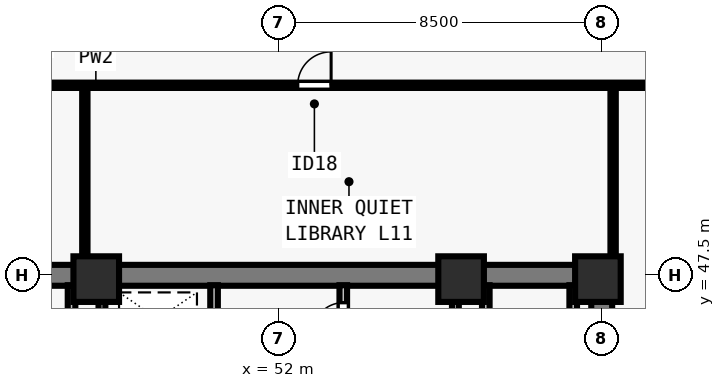
"""IFC4 building model, lengths in metres.
Left out: names, types, materials, properties, quantities, classifications, styles, units other than length and angle.
Written with IfcOpenShell. Run it as: python <this file> out.ifc"""

import sys

from ifc_helpers import new_model, si_unit, direction, frame, frame_2d, origin, origin_2d, place, context, subcontext, project, spatial, rectangle, extrude, element, fill, save


model = new_model("IFC4")
c1 = context("Model", 3, precision=1e-05, world=origin(), true_north=direction((0.0, 1.0)))
c2 = subcontext(c1, "Body", "Model", "MODEL_VIEW")
j1 = project(units=[si_unit("LENGTHUNIT", "METRE"), si_unit("PLANEANGLEUNIT", "RADIAN")], contexts=[c1])
p1 = place(None, origin())
s1 = spatial("IfcSite", under=j1, at=p1, CompositionType="ELEMENT")
p2 = place(p1, origin())
s2 = spatial("IfcBuilding", under=s1, at=p2, CompositionType="ELEMENT")
p3 = place(p2, frame((0.0, 0.0, 44.5)))
s3 = spatial("IfcBuildingStorey", under=s2, at=p3, CompositionType="ELEMENT", Elevation=44.5)
for number, where, z_axis, x_axis in (
    (1, (47.2, 47.4, 0.0), (0.0, 0.0, 1.0), (1.0, 0.0, 0.0)),
    (2, (56.8, 47.4, 0.0), (0.0, 0.0, 1.0), (1.0, 0.0, 0.0)),
    (3, (60.4, 47.4, 0.0), (0.0, 0.0, 1.0), (1.0, 0.0, 0.0)),
):
    element("IfcColumn", number, at=place(p3, frame(where, z_axis=z_axis, x_axis=x_axis)), inside=s3, PredefinedType="COLUMN", context=c2, shape_type="SweptSolid", body=[
        extrude(rectangle(XDim=1.2, YDim=1.2, at=origin_2d()), origin(), (0.0, 0.0, 1.0), 3.5),
    ])
p4 = place(p3, frame((43.225, 47.5, 0.0), z_axis=(0.0, 0.0, 1.0), x_axis=(1.0, 0.0, 0.0)))
e4 = element("IfcWall", 4, at=p4, inside=s3, PredefinedType="SHEAR", context=c2, shape_type="SweptSolid", body=[
    extrude(rectangle(XDim=17.55, YDim=0.55, at=frame_2d((8.775, 0.0))), origin(), (0.0, 0.0, 1.0), 3.28),
])
p5 = place(p3, frame((60.5, 40.8, 0.0), z_axis=(0.0, 0.0, 1.0), x_axis=(0.0, 1.0, 0.0)))
e5 = element("IfcWall", 5, at=p5, inside=s3, PredefinedType="SHEAR", context=c2, shape_type="SweptSolid", body=[
    extrude(rectangle(XDim=6.435, YDim=0.55, at=frame_2d((3.218, 0.0))), origin(), (0.0, 0.0, 1.0), 3.28),
])
p6 = place(p3, frame((50.3, 40.585, 0.0), z_axis=(0.0, 0.0, 1.0), x_axis=(0.0, 1.0, 0.0)))
e6 = element("IfcWall", 6, at=p6, inside=s3, PredefinedType="SOLIDWALL", context=c2, shape_type="SweptSolid", body=[
    extrude(rectangle(XDim=6.655, YDim=0.2, at=frame_2d((3.328, 0.0))), origin(), (0.0, 0.0, 1.0), 3.28),
])
p7 = place(p6, frame((5.065, 0.0, 0.0)))
e7 = element("IfcOpeningElement", 7, at=p7, cuts=e6, PredefinedType="OPENING", context=c2, shape_type="SweptSolid", body=[
    extrude(rectangle(XDim=0.8, YDim=2.08, at=frame_2d((0.4, 1.04))), frame((0.0, 0.11, 0.0), z_axis=(0.0, -1.0, 0.0), x_axis=(1.0, 0.0, 0.0)), (0.0, 0.0, 1.0), 0.22),
])
p8 = place(p3, frame((53.7, 40.585, 0.0), z_axis=(0.0, 0.0, 1.0), x_axis=(0.0, 1.0, 0.0)))
e8 = element("IfcWall", 8, at=p8, inside=s3, PredefinedType="SOLIDWALL", context=c2, shape_type="SweptSolid", body=[
    extrude(rectangle(XDim=6.655, YDim=0.2, at=frame_2d((3.328, 0.0))), origin(), (0.0, 0.0, 1.0), 3.28),
])
p9 = place(p8, frame((0.195, 0.0, 0.0)))
e9 = element("IfcOpeningElement", 9, at=p9, cuts=e8, PredefinedType="OPENING", context=c2, shape_type="SweptSolid", body=[
    extrude(rectangle(XDim=0.8, YDim=2.08, at=frame_2d((0.4, 1.04))), frame((0.0, 0.11, 0.0), z_axis=(0.0, -1.0, 0.0), x_axis=(1.0, 0.0, 0.0)), (0.0, 0.0, 1.0), 0.22),
])
p10 = place(p8, frame((3.735, 0.0, 0.0)))
e10 = element("IfcOpeningElement", 10, at=p10, cuts=e8, PredefinedType="OPENING", context=c2, shape_type="SweptSolid", body=[
    extrude(rectangle(XDim=0.9, YDim=2.12, at=frame_2d((0.45, 1.06))), frame((0.0, 0.11, 0.0), z_axis=(0.0, -1.0, 0.0), x_axis=(1.0, 0.0, 0.0)), (0.0, 0.0, 1.0), 0.22),
])
p11 = place(p8, frame((5.395, 0.0, 0.0)))
e11 = element("IfcOpeningElement", 11, at=p11, cuts=e8, PredefinedType="OPENING", context=c2, shape_type="SweptSolid", body=[
    extrude(rectangle(XDim=0.8, YDim=2.1, at=frame_2d((0.4, 1.05))), frame((0.0, 0.11, 0.0), z_axis=(0.0, -1.0, 0.0), x_axis=(1.0, 0.0, 0.0)), (0.0, 0.0, 1.0), 0.22),
])
for number, where, z_axis, x_axis in (
    (12, (46.55, 43.735, 0.0), (0.0, 0.0, 1.0), (0.0, 1.0, 0.0)),
    (13, (57.45, 43.735, 0.0), (0.0, 0.0, 1.0), (0.0, 1.0, 0.0)),
    (14, (59.75, 43.735, 0.0), (0.0, 0.0, 1.0), (0.0, 1.0, 0.0)),
):
    element("IfcWall", number, at=place(p3, frame(where, z_axis=z_axis, x_axis=x_axis)), inside=s3, PredefinedType="SOLIDWALL", context=c2, shape_type="SweptSolid", body=[
        extrude(rectangle(XDim=3.505, YDim=0.2, at=frame_2d((1.752, 0.0))), origin(), (0.0, 0.0, 1.0), 3.28),
    ])
for number, where, z_axis, x_axis in (
    (15, (47.35, 43.735, 0.0), (0.0, 0.0, 1.0), (0.0, 1.0, 0.0)),
    (16, (56.65, 43.735, 0.0), (0.0, 0.0, 1.0), (0.0, 1.0, 0.0)),
):
    element("IfcWall", number, at=place(p3, frame(where, z_axis=z_axis, x_axis=x_axis)), inside=s3, PredefinedType="SOLIDWALL", context=c2, shape_type="SweptSolid", body=[
        extrude(rectangle(XDim=3.505, YDim=0.18, at=frame_2d((1.752, 0.0))), origin(), (0.0, 0.0, 1.0), 3.28),
    ])
p12 = place(p3, frame((38.8, 52.5, 0.0), z_axis=(0.0, 0.0, 1.0), x_axis=(1.0, 0.0, 0.0)))
e17 = element("IfcWall", 17, at=p12, inside=s3, PredefinedType="PARTITIONING", context=c2, shape_type="SweptSolid", body=[
    extrude(rectangle(XDim=26.4, YDim=0.14, at=frame_2d((13.2, 0.0))), origin(), (0.0, 0.0, 1.0), 3.28),
])
p13 = place(p12, frame((2.2, 0.0, 0.0)))
e18 = element("IfcOpeningElement", 18, at=p13, cuts=e17, PredefinedType="OPENING", context=c2, shape_type="SweptSolid", body=[
    extrude(rectangle(XDim=0.88, YDim=2.1, at=frame_2d((0.44, 1.05))), frame((0.0, 0.08, 0.0), z_axis=(0.0, -1.0, 0.0), x_axis=(1.0, 0.0, 0.0)), (0.0, 0.0, 1.0), 0.16),
])
p14 = place(p12, frame((13.7, 0.0, 0.0)))
e19 = element("IfcOpeningElement", 19, at=p14, cuts=e17, PredefinedType="OPENING", context=c2, shape_type="SweptSolid", body=[
    extrude(rectangle(XDim=0.88, YDim=2.1, at=frame_2d((0.44, 1.05))), frame((0.0, 0.08, 0.0), z_axis=(0.0, -1.0, 0.0), x_axis=(1.0, 0.0, 0.0)), (0.0, 0.0, 1.0), 0.16),
])
p15 = place(p12, frame((23.2, 0.0, 0.0)))
e20 = element("IfcOpeningElement", 20, at=p15, cuts=e17, PredefinedType="OPENING", context=c2, shape_type="SweptSolid", body=[
    extrude(rectangle(XDim=0.88, YDim=2.1, at=frame_2d((0.44, 1.05))), frame((0.0, 0.08, 0.0), z_axis=(0.0, -1.0, 0.0), x_axis=(1.0, 0.0, 0.0)), (0.0, 0.0, 1.0), 0.16),
])
p16 = place(p3, frame((46.9, 47.76, 0.0), z_axis=(0.0, 0.0, 1.0), x_axis=(0.0, 1.0, 0.0)))
e21 = element("IfcWall", 21, at=p16, inside=s3, PredefinedType="PARTITIONING", context=c2, shape_type="SweptSolid", body=[
    extrude(rectangle(XDim=4.685, YDim=0.14, at=frame_2d((2.343, 0.0))), origin(), (0.0, 0.0, 1.0), 3.28),
])
p17 = place(p3, frame((60.8, 47.76, 0.0), z_axis=(0.0, 0.0, 1.0), x_axis=(0.0, 1.0, 0.0)))
e22 = element("IfcWall", 22, at=p17, inside=s3, PredefinedType="PARTITIONING", context=c2, shape_type="SweptSolid", body=[
    extrude(rectangle(XDim=4.685, YDim=0.14, at=frame_2d((2.343, 0.0))), origin(), (0.0, 0.0, 1.0), 2.439),
])
p18 = place(p11, origin())
e23 = element("IfcDoor", 23, at=p18, inside=s3, OperationType="SINGLE_SWING_LEFT", PredefinedType="DOOR", context=c2, shape_type="SweptSolid", body=[
    extrude(rectangle(XDim=0.8, YDim=2.1, at=frame_2d((0.4, 1.05))), frame((0.0, 0.025, 0.0), z_axis=(0.0, -1.0, 0.0), x_axis=(1.0, 0.0, 0.0)), (0.0, 0.0, 1.0), 0.05),
])
fill(e11, e23)
p19 = place(p14, origin())
e24 = element("IfcDoor", 24, at=p19, inside=s3, OperationType="SINGLE_SWING_RIGHT", PredefinedType="DOOR", context=c2, shape_type="SweptSolid", body=[
    extrude(rectangle(XDim=0.88, YDim=2.1, at=frame_2d((0.44, 1.05))), frame((0.0, 0.025, 0.0), z_axis=(0.0, -1.0, 0.0), x_axis=(1.0, 0.0, 0.0)), (0.0, 0.0, 1.0), 0.05),
])
fill(e19, e24)
save(model, sys.argv[1])
